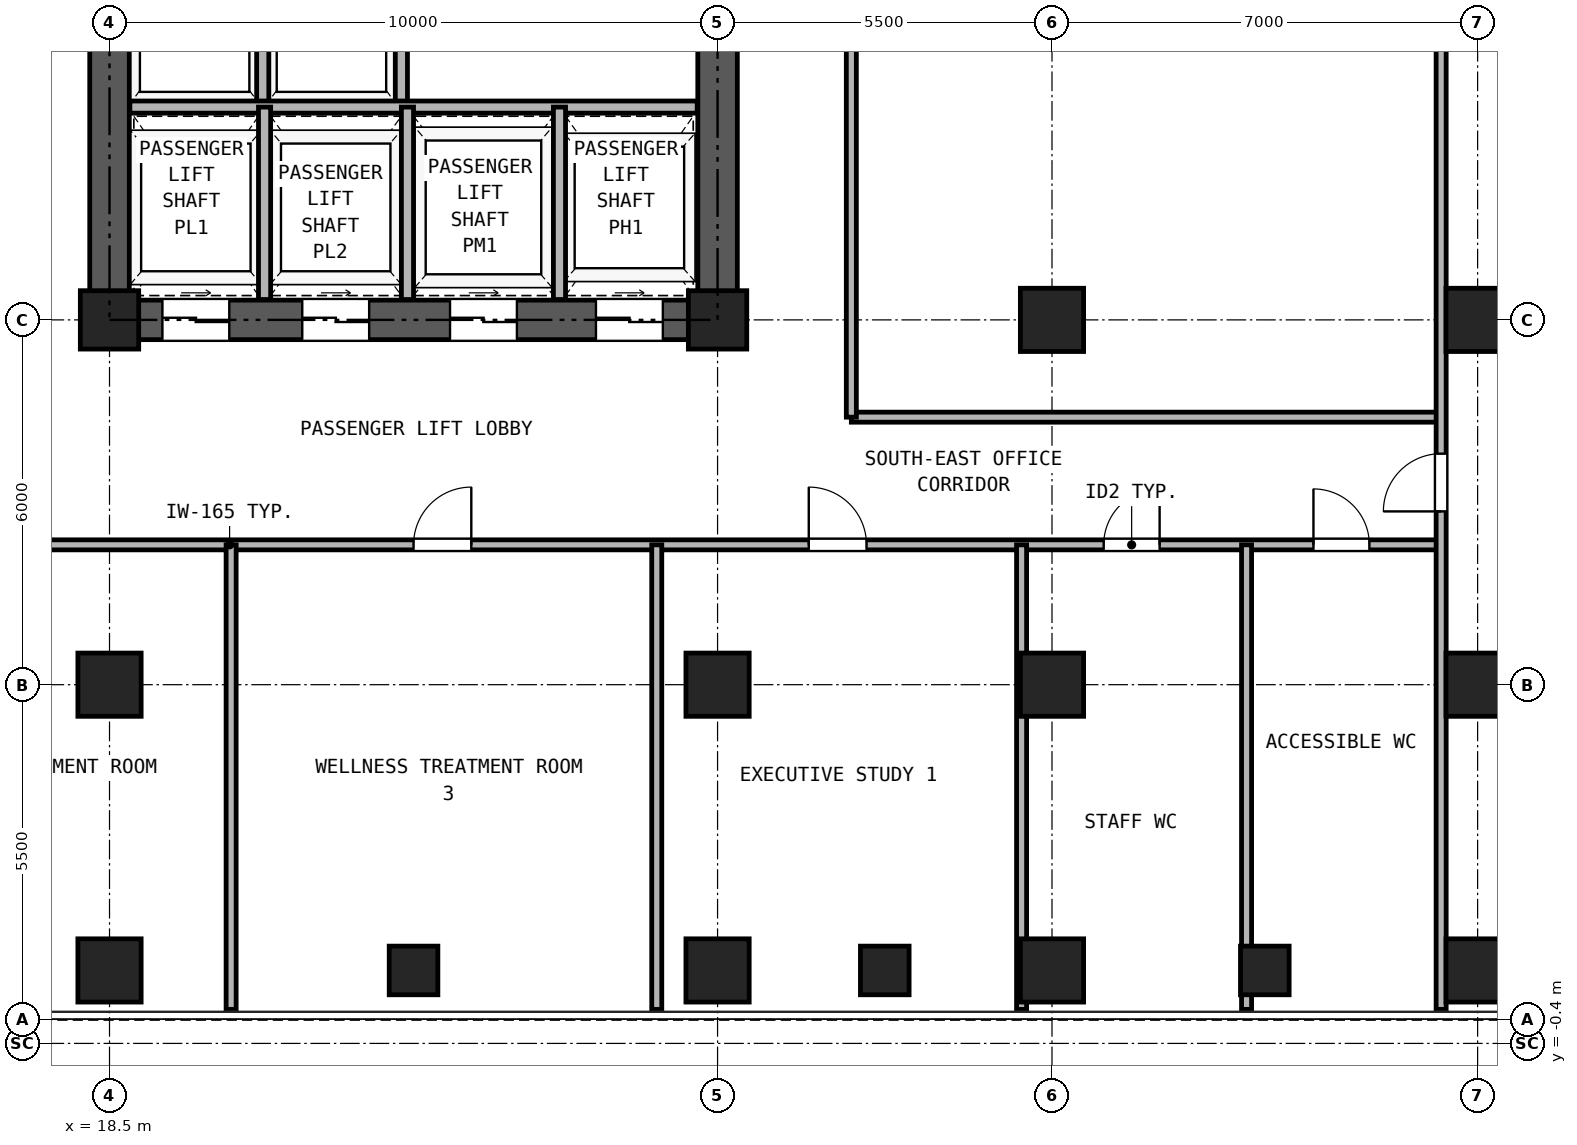
"""IFC4 building model, lengths in metres.
Left out: names, types, materials, properties, quantities, classifications, styles, units other than length and angle.
Written with IfcOpenShell. Run it as: python <this file> out.ifc"""

import sys

from ifc_helpers import new_model, si_unit, direction, frame, frame_2d, origin, origin_2d, place, context, subcontext, project, spatial, rectangle, hollow_rectangle, extrude, source, transform, mapped, element, fill, save


model = new_model("IFC4")
c1 = context("Model", 3, precision=1e-05, world=origin(), true_north=direction((0.0, 1.0)))
c2 = subcontext(c1, "Body", "Model", "MODEL_VIEW")
j1 = project(units=[si_unit("LENGTHUNIT", "METRE"), si_unit("PLANEANGLEUNIT", "RADIAN")], contexts=[c1])
p1 = place(None, origin())
s1 = spatial("IfcSite", under=j1, at=p1, CompositionType="ELEMENT")
p2 = place(p1, origin())
s2 = spatial("IfcBuilding", under=s1, at=p2, CompositionType="ELEMENT")
p3 = place(p2, frame((0.0, 0.0, 84.6)))
s3 = spatial("IfcBuildingStorey", under=s2, at=p3, CompositionType="ELEMENT", Elevation=84.6)
m1 = source(origin(), c2, "Body", "SweptSolid", [
    extrude(hollow_rectangle(XDim=1.04, YDim=1.04, WallThickness=0.065, at=origin_2d()), origin(), (0.0, 0.0, 1.0), 3.24),
])
for number, where, z_axis, x_axis in (
    (1, (18.5, 0.8, 0.0), (0.0, 0.0, 1.0), (1.0, 0.0, 0.0)),
    (2, (28.5, 0.8, 0.0), (0.0, 0.0, 1.0), (1.0, 0.0, 0.0)),
    (3, (34.0, 0.8, 0.0), (0.0, 0.0, 1.0), (1.0, 0.0, 0.0)),
    (4, (41.0, 0.8, 0.0), (0.0, 0.0, 1.0), (1.0, 0.0, 0.0)),
    (5, (18.5, 5.5, 0.0), (0.0, 0.0, 1.0), (1.0, 0.0, 0.0)),
):
    element("IfcColumn", number, at=place(p3, frame(where, z_axis=z_axis, x_axis=x_axis)), inside=s3, PredefinedType="COLUMN", context=c2, shape_type="MappedRepresentation", body=[
        mapped(m1, transform((0.0, 0.0, 0.0), x_axis=(1.0, 0.0, 0.0), y_axis=(0.0, 1.0, 0.0), z_axis=(0.0, 0.0, 1.0), scale=1.0)),
    ])
m2 = source(origin(), c2, "Body", "SweptSolid", [
    extrude(hollow_rectangle(XDim=0.96, YDim=0.96, WallThickness=0.06, at=origin_2d()), origin(), (0.0, 0.0, 1.0), 3.24),
])
p4 = place(p3, frame((18.5, 11.5, 0.0), z_axis=(0.0, 0.0, 1.0), x_axis=(1.0, 0.0, 0.0)))
e6 = element("IfcColumn", 6, at=p4, inside=s3, PredefinedType="COLUMN", context=c2, shape_type="MappedRepresentation", body=[
    mapped(m2, transform((0.0, 0.0, 0.0), x_axis=(1.0, 0.0, 0.0), y_axis=(0.0, 1.0, 0.0), z_axis=(0.0, 0.0, 1.0), scale=1.0)),
])
p5 = place(p3, frame((28.5, 5.5, 0.0), z_axis=(0.0, 0.0, 1.0), x_axis=(1.0, 0.0, 0.0)))
e7 = element("IfcColumn", 7, at=p5, inside=s3, PredefinedType="COLUMN", context=c2, shape_type="MappedRepresentation", body=[
    mapped(m1, transform((0.0, 0.0, 0.0), x_axis=(1.0, 0.0, 0.0), y_axis=(0.0, 1.0, 0.0), z_axis=(0.0, 0.0, 1.0), scale=1.0)),
])
p6 = place(p3, frame((28.5, 11.5, 0.0), z_axis=(0.0, 0.0, 1.0), x_axis=(1.0, 0.0, 0.0)))
e8 = element("IfcColumn", 8, at=p6, inside=s3, PredefinedType="COLUMN", context=c2, shape_type="MappedRepresentation", body=[
    mapped(m2, transform((0.0, 0.0, 0.0), x_axis=(1.0, 0.0, 0.0), y_axis=(0.0, 1.0, 0.0), z_axis=(0.0, 0.0, 1.0), scale=1.0)),
])
for number, where, z_axis, x_axis in (
    (9, (34.0, 5.5, 0.0), (0.0, 0.0, 1.0), (1.0, 0.0, 0.0)),
    (10, (34.0, 11.5, 0.0), (0.0, 0.0, 1.0), (1.0, 0.0, 0.0)),
    (11, (41.0, 5.5, 0.0), (0.0, 0.0, 1.0), (1.0, 0.0, 0.0)),
    (12, (41.0, 11.5, 0.0), (0.0, 0.0, 1.0), (1.0, 0.0, 0.0)),
):
    element("IfcColumn", number, at=place(p3, frame(where, z_axis=z_axis, x_axis=x_axis)), inside=s3, PredefinedType="COLUMN", context=c2, shape_type="MappedRepresentation", body=[
        mapped(m1, transform((0.0, 0.0, 0.0), x_axis=(1.0, 0.0, 0.0), y_axis=(0.0, 1.0, 0.0), z_axis=(0.0, 0.0, 1.0), scale=1.0)),
    ])
m3 = source(origin(), c2, "Body", "SweptSolid", [
    extrude(hollow_rectangle(XDim=0.8, YDim=0.8, WallThickness=0.045, at=origin_2d()), origin(), (0.0, 0.0, 1.0), 3.24),
])
for number, where, z_axis, x_axis in (
    (13, (23.5, 0.8, 0.0), (0.0, 0.0, 1.0), (1.0, 0.0, 0.0)),
    (14, (31.25, 0.8, 0.0), (0.0, 0.0, 1.0), (1.0, 0.0, 0.0)),
    (15, (37.5, 0.8, 0.0), (0.0, 0.0, 1.0), (1.0, 0.0, 0.0)),
):
    element("IfcColumn", number, at=place(p3, frame(where, z_axis=z_axis, x_axis=x_axis)), inside=s3, PredefinedType="COLUMN", context=c2, shape_type="MappedRepresentation", body=[
        mapped(m3, transform((0.0, 0.0, 0.0), x_axis=(1.0, 0.0, 0.0), y_axis=(0.0, 1.0, 0.0), z_axis=(0.0, 0.0, 1.0), scale=1.0)),
    ])
p7 = place(p3, frame((18.175, 11.5, 0.0), z_axis=(0.0, 0.0, 1.0), x_axis=(1.0, 0.0, 0.0)))
e16 = element("IfcWall", 16, at=p7, inside=s3, PredefinedType="SHEAR", context=c2, shape_type="SweptSolid", body=[
    extrude(rectangle(XDim=10.65, YDim=0.65, at=frame_2d((5.325, 0.0))), origin(), (0.0, 0.0, 1.0), 3.24),
])
p8 = place(p7, frame((1.195, 0.0, 0.0)))
e17 = element("IfcOpeningElement", 17, at=p8, cuts=e16, PredefinedType="OPENING", context=c2, shape_type="SweptSolid", body=[
    extrude(rectangle(XDim=1.1, YDim=2.25, at=frame_2d((0.55, 1.125))), frame((0.0, 0.335, 0.0), z_axis=(0.0, -1.0, 0.0), x_axis=(1.0, 0.0, 0.0)), (0.0, 0.0, 1.0), 0.67),
])
p9 = place(p7, frame((3.495, 0.0, 0.0)))
e18 = element("IfcOpeningElement", 18, at=p9, cuts=e16, PredefinedType="OPENING", context=c2, shape_type="SweptSolid", body=[
    extrude(rectangle(XDim=1.1, YDim=2.25, at=frame_2d((0.55, 1.125))), frame((0.0, 0.335, 0.0), z_axis=(0.0, -1.0, 0.0), x_axis=(1.0, 0.0, 0.0)), (0.0, 0.0, 1.0), 0.67),
])
p10 = place(p7, frame((5.925, 0.0, 0.0)))
e19 = element("IfcOpeningElement", 19, at=p10, cuts=e16, PredefinedType="OPENING", context=c2, shape_type="SweptSolid", body=[
    extrude(rectangle(XDim=1.1, YDim=2.25, at=frame_2d((0.55, 1.125))), frame((0.0, 0.335, 0.0), z_axis=(0.0, -1.0, 0.0), x_axis=(1.0, 0.0, 0.0)), (0.0, 0.0, 1.0), 0.67),
])
p11 = place(p7, frame((8.325, 0.0, 0.0)))
e20 = element("IfcOpeningElement", 20, at=p11, cuts=e16, PredefinedType="OPENING", context=c2, shape_type="SweptSolid", body=[
    extrude(rectangle(XDim=1.1, YDim=2.25, at=frame_2d((0.55, 1.125))), frame((0.0, 0.335, 0.0), z_axis=(0.0, -1.0, 0.0), x_axis=(1.0, 0.0, 0.0)), (0.0, 0.0, 1.0), 0.67),
])
p12 = place(p3, frame((18.5, 11.825, 0.0), z_axis=(0.0, 0.0, 1.0), x_axis=(0.0, 1.0, 0.0)))
e21 = element("IfcWall", 21, at=p12, inside=s3, PredefinedType="SHEAR", context=c2, shape_type="SweptSolid", body=[
    extrude(rectangle(XDim=16.6, YDim=0.65, at=frame_2d((8.3, 0.0))), origin(), (0.0, 0.0, 1.0), 3.24),
])
p13 = place(p12, frame((7.325, 0.0, 0.0)))
e22 = element("IfcOpeningElement", 22, at=p13, cuts=e21, PredefinedType="OPENING", context=c2, shape_type="SweptSolid", body=[
    extrude(rectangle(XDim=1.15, YDim=2.2, at=frame_2d((0.575, 1.1))), frame((0.0, 0.335, 0.0), z_axis=(0.0, -1.0, 0.0), x_axis=(1.0, 0.0, 0.0)), (0.0, 0.0, 1.0), 0.67),
])
p14 = place(p3, frame((28.5, 11.825, 0.0), z_axis=(0.0, 0.0, 1.0), x_axis=(0.0, 1.0, 0.0)))
e23 = element("IfcWall", 23, at=p14, inside=s3, PredefinedType="SHEAR", context=c2, shape_type="SweptSolid", body=[
    extrude(rectangle(XDim=16.6, YDim=0.65, at=frame_2d((8.3, 0.0))), origin(), (0.0, 0.0, 1.0), 3.24),
])
p15 = place(p14, frame((7.325, 0.0, 0.0)))
e24 = element("IfcOpeningElement", 24, at=p15, cuts=e23, PredefinedType="OPENING", context=c2, shape_type="SweptSolid", body=[
    extrude(rectangle(XDim=1.15, YDim=2.2, at=frame_2d((0.575, 1.1))), frame((0.0, 0.335, 0.0), z_axis=(0.0, -1.0, 0.0), x_axis=(1.0, 0.0, 0.0)), (0.0, 0.0, 1.0), 0.67),
])
for number, where, z_axis, x_axis in (
    (25, (21.02, 15.0, 0.0), (0.0, 0.0, 1.0), (0.0, 1.0, 0.0)),
    (26, (23.3, 15.0, 0.0), (0.0, 0.0, 1.0), (0.0, 1.0, 0.0)),
):
    element("IfcWall", number, at=place(p3, frame(where, z_axis=z_axis, x_axis=x_axis)), inside=s3, PredefinedType="PARTITIONING", context=c2, shape_type="SweptSolid", body=[
        extrude(rectangle(XDim=3.0, YDim=0.2, at=frame_2d((1.5, 0.0))), origin(), (0.0, 0.0, 1.0), 3.24),
    ])
p16 = place(p3, frame((18.835, 15.0, 0.0), z_axis=(0.0, 0.0, 1.0), x_axis=(1.0, 0.0, 0.0)))
e27 = element("IfcWall", 27, at=p16, inside=s3, PredefinedType="PARTITIONING", context=c2, shape_type="SweptSolid", body=[
    extrude(rectangle(XDim=9.33, YDim=0.2, at=frame_2d((4.665, 0.0))), origin(), (0.0, 0.0, 1.0), 3.24),
])
for number, where, z_axis, x_axis in (
    (28, (21.05, 11.835, 0.0), (0.0, 0.0, 1.0), (0.0, 1.0, 0.0)),
    (29, (23.4, 11.835, 0.0), (0.0, 0.0, 1.0), (0.0, 1.0, 0.0)),
    (30, (25.9, 11.835, 0.0), (0.0, 0.0, 1.0), (0.0, 1.0, 0.0)),
):
    element("IfcWall", number, at=place(p3, frame(where, z_axis=z_axis, x_axis=x_axis)), inside=s3, PredefinedType="PARTITIONING", context=c2, shape_type="SweptSolid", body=[
        extrude(rectangle(XDim=3.165, YDim=0.2, at=frame_2d((1.583, 0.0))), origin(), (0.0, 0.0, 1.0), 3.24),
    ])
p17 = place(p3, frame((6.6, 7.8, 0.0), z_axis=(0.0, 0.0, 1.0), x_axis=(1.0, 0.0, 0.0)))
e31 = element("IfcWall", 31, at=p17, inside=s3, PredefinedType="PARTITIONING", context=c2, shape_type="SweptSolid", body=[
    extrude(rectangle(XDim=33.8, YDim=0.165, at=frame_2d((16.9, 0.0))), origin(), (0.0, 0.0, 1.0), 3.24),
])
p18 = place(p17, frame((2.95, 0.0, 0.0)))
e32 = element("IfcOpeningElement", 32, at=p18, cuts=e31, PredefinedType="OPENING", context=c2, shape_type="SweptSolid", body=[
    extrude(rectangle(XDim=0.95, YDim=2.15, at=frame_2d((0.475, 1.075))), frame((0.0, 0.093, 0.0), z_axis=(0.0, -1.0, 0.0), x_axis=(1.0, 0.0, 0.0)), (0.0, 0.0, 1.0), 0.185),
])
p19 = place(p17, frame((9.9, 0.0, 0.0)))
e33 = element("IfcOpeningElement", 33, at=p19, cuts=e31, PredefinedType="OPENING", context=c2, shape_type="SweptSolid", body=[
    extrude(rectangle(XDim=0.95, YDim=2.15, at=frame_2d((0.475, 1.075))), frame((0.0, 0.093, 0.0), z_axis=(0.0, -1.0, 0.0), x_axis=(1.0, 0.0, 0.0)), (0.0, 0.0, 1.0), 0.185),
])
p20 = place(p17, frame((16.9, 0.0, 0.0)))
e34 = element("IfcOpeningElement", 34, at=p20, cuts=e31, PredefinedType="OPENING", context=c2, shape_type="SweptSolid", body=[
    extrude(rectangle(XDim=0.95, YDim=2.15, at=frame_2d((0.475, 1.075))), frame((0.0, 0.093, 0.0), z_axis=(0.0, -1.0, 0.0), x_axis=(1.0, 0.0, 0.0)), (0.0, 0.0, 1.0), 0.185),
])
p21 = place(p17, frame((23.4, 0.0, 0.0)))
e35 = element("IfcOpeningElement", 35, at=p21, cuts=e31, PredefinedType="OPENING", context=c2, shape_type="SweptSolid", body=[
    extrude(rectangle(XDim=0.95, YDim=2.15, at=frame_2d((0.475, 1.075))), frame((0.0, 0.093, 0.0), z_axis=(0.0, -1.0, 0.0), x_axis=(1.0, 0.0, 0.0)), (0.0, 0.0, 1.0), 0.185),
])
p22 = place(p17, frame((28.25, 0.0, 0.0)))
e36 = element("IfcOpeningElement", 36, at=p22, cuts=e31, PredefinedType="OPENING", context=c2, shape_type="SweptSolid", body=[
    extrude(rectangle(XDim=0.92, YDim=2.1, at=frame_2d((0.46, 1.05))), frame((0.0, 0.093, 0.0), z_axis=(0.0, -1.0, 0.0), x_axis=(1.0, 0.0, 0.0)), (0.0, 0.0, 1.0), 0.185),
])
p23 = place(p17, frame((31.7, 0.0, 0.0)))
e37 = element("IfcOpeningElement", 37, at=p23, cuts=e31, PredefinedType="OPENING", context=c2, shape_type="SweptSolid", body=[
    extrude(rectangle(XDim=0.92, YDim=2.1, at=frame_2d((0.46, 1.05))), frame((0.0, 0.093, 0.0), z_axis=(0.0, -1.0, 0.0), x_axis=(1.0, 0.0, 0.0)), (0.0, 0.0, 1.0), 0.185),
])
p24 = place(p3, frame((30.7, 9.9, 0.0), z_axis=(0.0, 0.0, 1.0), x_axis=(1.0, 0.0, 0.0)))
e38 = element("IfcWall", 38, at=p24, inside=s3, PredefinedType="PARTITIONING", context=c2, shape_type="SweptSolid", body=[
    extrude(rectangle(XDim=9.7, YDim=0.165, at=frame_2d((4.85, 0.0))), origin(), (0.0, 0.0, 1.0), 3.24),
])
p25 = place(p3, frame((30.7, 9.9, 0.0), z_axis=(0.0, 0.0, 1.0), x_axis=(0.0, 1.0, 0.0)))
e39 = element("IfcWall", 39, at=p25, inside=s3, PredefinedType="PARTITIONING", context=c2, shape_type="SweptSolid", body=[
    extrude(rectangle(XDim=19.95, YDim=0.165, at=frame_2d((9.975, 0.0))), origin(), (0.0, 0.0, 1.0), 3.24),
])
p26 = place(p25, frame((9.475, 0.0, 0.0)))
e40 = element("IfcOpeningElement", 40, at=p26, cuts=e39, PredefinedType="OPENING", context=c2, shape_type="SweptSolid", body=[
    extrude(rectangle(XDim=0.95, YDim=2.15, at=frame_2d((0.475, 1.075))), frame((0.0, 0.093, 0.0), z_axis=(0.0, -1.0, 0.0), x_axis=(1.0, 0.0, 0.0)), (0.0, 0.0, 1.0), 0.185),
])
p27 = place(p3, frame((40.4, 0.16, 0.0), z_axis=(0.0, 0.0, 1.0), x_axis=(0.0, 1.0, 0.0)))
e41 = element("IfcWall", 41, at=p27, inside=s3, PredefinedType="PARTITIONING", context=c2, shape_type="SweptSolid", body=[
    extrude(rectangle(XDim=40.18, YDim=0.165, at=frame_2d((20.09, 0.0))), origin(), (0.0, 0.0, 1.0), 3.24),
])
p28 = place(p27, frame((8.19, 0.0, 0.0)))
e42 = element("IfcOpeningElement", 42, at=p28, cuts=e41, PredefinedType="OPENING", context=c2, shape_type="SweptSolid", body=[
    extrude(rectangle(XDim=0.95, YDim=2.15, at=frame_2d((0.475, 1.075))), frame((0.0, 0.093, 0.0), z_axis=(0.0, -1.0, 0.0), x_axis=(1.0, 0.0, 0.0)), (0.0, 0.0, 1.0), 0.185),
])
p29 = place(p27, frame((30.24, 0.0, 0.0)))
e43 = element("IfcOpeningElement", 43, at=p29, cuts=e41, PredefinedType="OPENING", context=c2, shape_type="SweptSolid", body=[
    extrude(rectangle(XDim=0.95, YDim=2.15, at=frame_2d((0.475, 1.075))), frame((0.0, 0.093, 0.0), z_axis=(0.0, -1.0, 0.0), x_axis=(1.0, 0.0, 0.0)), (0.0, 0.0, 1.0), 0.185),
])
for number, where, z_axis, x_axis in (
    (44, (20.5, 0.16, 0.0), (0.0, 0.0, 1.0), (0.0, 1.0, 0.0)),
    (45, (27.5, 0.16, 0.0), (0.0, 0.0, 1.0), (0.0, 1.0, 0.0)),
    (46, (33.5, 0.16, 0.0), (0.0, 0.0, 1.0), (0.0, 1.0, 0.0)),
    (47, (37.2, 0.16, 0.0), (0.0, 0.0, 1.0), (0.0, 1.0, 0.0)),
):
    element("IfcWall", number, at=place(p3, frame(where, z_axis=z_axis, x_axis=x_axis)), inside=s3, PredefinedType="PARTITIONING", context=c2, shape_type="SweptSolid", body=[
        extrude(rectangle(XDim=7.64, YDim=0.165, at=frame_2d((3.82, 0.0))), origin(), (0.0, 0.0, 1.0), 3.24),
    ])
p30 = place(p8, frame((1.1, 0.0, 0.0), z_axis=(0.0, 0.0, 1.0), x_axis=(-1.0, 0.0, 0.0)))
e48 = element("IfcDoor", 48, at=p30, inside=s3, OperationType="DOUBLE_DOOR_SLIDING", PredefinedType="DOOR", context=c2, shape_type="SweptSolid", body=[
    extrude(rectangle(XDim=1.1, YDim=2.25, at=frame_2d((0.55, 1.125))), frame((0.0, 0.025, 0.0), z_axis=(0.0, -1.0, 0.0), x_axis=(1.0, 0.0, 0.0)), (0.0, 0.0, 1.0), 0.05),
])
fill(e17, e48)
p31 = place(p9, frame((1.1, 0.0, 0.0), z_axis=(0.0, 0.0, 1.0), x_axis=(-1.0, 0.0, 0.0)))
e49 = element("IfcDoor", 49, at=p31, inside=s3, OperationType="DOUBLE_DOOR_SLIDING", PredefinedType="DOOR", context=c2, shape_type="SweptSolid", body=[
    extrude(rectangle(XDim=1.1, YDim=2.25, at=frame_2d((0.55, 1.125))), frame((0.0, 0.025, 0.0), z_axis=(0.0, -1.0, 0.0), x_axis=(1.0, 0.0, 0.0)), (0.0, 0.0, 1.0), 0.05),
])
fill(e18, e49)
p32 = place(p10, frame((1.1, 0.0, 0.0), z_axis=(0.0, 0.0, 1.0), x_axis=(-1.0, 0.0, 0.0)))
e50 = element("IfcDoor", 50, at=p32, inside=s3, OperationType="DOUBLE_DOOR_SLIDING", PredefinedType="DOOR", context=c2, shape_type="SweptSolid", body=[
    extrude(rectangle(XDim=1.1, YDim=2.25, at=frame_2d((0.55, 1.125))), frame((0.0, 0.025, 0.0), z_axis=(0.0, -1.0, 0.0), x_axis=(1.0, 0.0, 0.0)), (0.0, 0.0, 1.0), 0.05),
])
fill(e19, e50)
p33 = place(p11, frame((1.1, 0.0, 0.0), z_axis=(0.0, 0.0, 1.0), x_axis=(-1.0, 0.0, 0.0)))
e51 = element("IfcDoor", 51, at=p33, inside=s3, OperationType="DOUBLE_DOOR_SLIDING", PredefinedType="DOOR", context=c2, shape_type="SweptSolid", body=[
    extrude(rectangle(XDim=1.1, YDim=2.25, at=frame_2d((0.55, 1.125))), frame((0.0, 0.025, 0.0), z_axis=(0.0, -1.0, 0.0), x_axis=(1.0, 0.0, 0.0)), (0.0, 0.0, 1.0), 0.05),
])
fill(e20, e51)
p34 = place(p20, frame((0.95, 0.0, 0.0), z_axis=(0.0, 0.0, 1.0), x_axis=(-1.0, 0.0, 0.0)))
e52 = element("IfcDoor", 52, at=p34, inside=s3, OperationType="SINGLE_SWING_RIGHT", PredefinedType="DOOR", context=c2, shape_type="SweptSolid", body=[
    extrude(rectangle(XDim=0.95, YDim=2.15, at=frame_2d((0.475, 1.075))), frame((0.0, 0.025, 0.0), z_axis=(0.0, -1.0, 0.0), x_axis=(1.0, 0.0, 0.0)), (0.0, 0.0, 1.0), 0.05),
])
fill(e34, e52)
p35 = place(p21, frame((0.95, 0.0, 0.0), z_axis=(0.0, 0.0, 1.0), x_axis=(-1.0, 0.0, 0.0)))
e53 = element("IfcDoor", 53, at=p35, inside=s3, OperationType="SINGLE_SWING_LEFT", PredefinedType="DOOR", context=c2, shape_type="SweptSolid", body=[
    extrude(rectangle(XDim=0.95, YDim=2.15, at=frame_2d((0.475, 1.075))), frame((0.0, 0.025, 0.0), z_axis=(0.0, -1.0, 0.0), x_axis=(1.0, 0.0, 0.0)), (0.0, 0.0, 1.0), 0.05),
])
fill(e35, e53)
p36 = place(p22, frame((0.92, 0.0, 0.0), z_axis=(0.0, 0.0, 1.0), x_axis=(-1.0, 0.0, 0.0)))
e54 = element("IfcDoor", 54, at=p36, inside=s3, OperationType="SINGLE_SWING_RIGHT", PredefinedType="DOOR", context=c2, shape_type="SweptSolid", body=[
    extrude(rectangle(XDim=0.92, YDim=2.1, at=frame_2d((0.46, 1.05))), frame((0.0, 0.025, 0.0), z_axis=(0.0, -1.0, 0.0), x_axis=(1.0, 0.0, 0.0)), (0.0, 0.0, 1.0), 0.05),
])
fill(e36, e54)
p37 = place(p23, frame((0.92, 0.0, 0.0), z_axis=(0.0, 0.0, 1.0), x_axis=(-1.0, 0.0, 0.0)))
e55 = element("IfcDoor", 55, at=p37, inside=s3, OperationType="SINGLE_SWING_LEFT", PredefinedType="DOOR", context=c2, shape_type="SweptSolid", body=[
    extrude(rectangle(XDim=0.92, YDim=2.1, at=frame_2d((0.46, 1.05))), frame((0.0, 0.025, 0.0), z_axis=(0.0, -1.0, 0.0), x_axis=(1.0, 0.0, 0.0)), (0.0, 0.0, 1.0), 0.05),
])
fill(e37, e55)
p38 = place(p28, origin())
e56 = element("IfcDoor", 56, at=p38, inside=s3, OperationType="SINGLE_SWING_LEFT", PredefinedType="DOOR", context=c2, shape_type="SweptSolid", body=[
    extrude(rectangle(XDim=0.95, YDim=2.15, at=frame_2d((0.475, 1.075))), frame((0.0, 0.025, 0.0), z_axis=(0.0, -1.0, 0.0), x_axis=(1.0, 0.0, 0.0)), (0.0, 0.0, 1.0), 0.05),
])
fill(e42, e56)
save(model, sys.argv[1])
